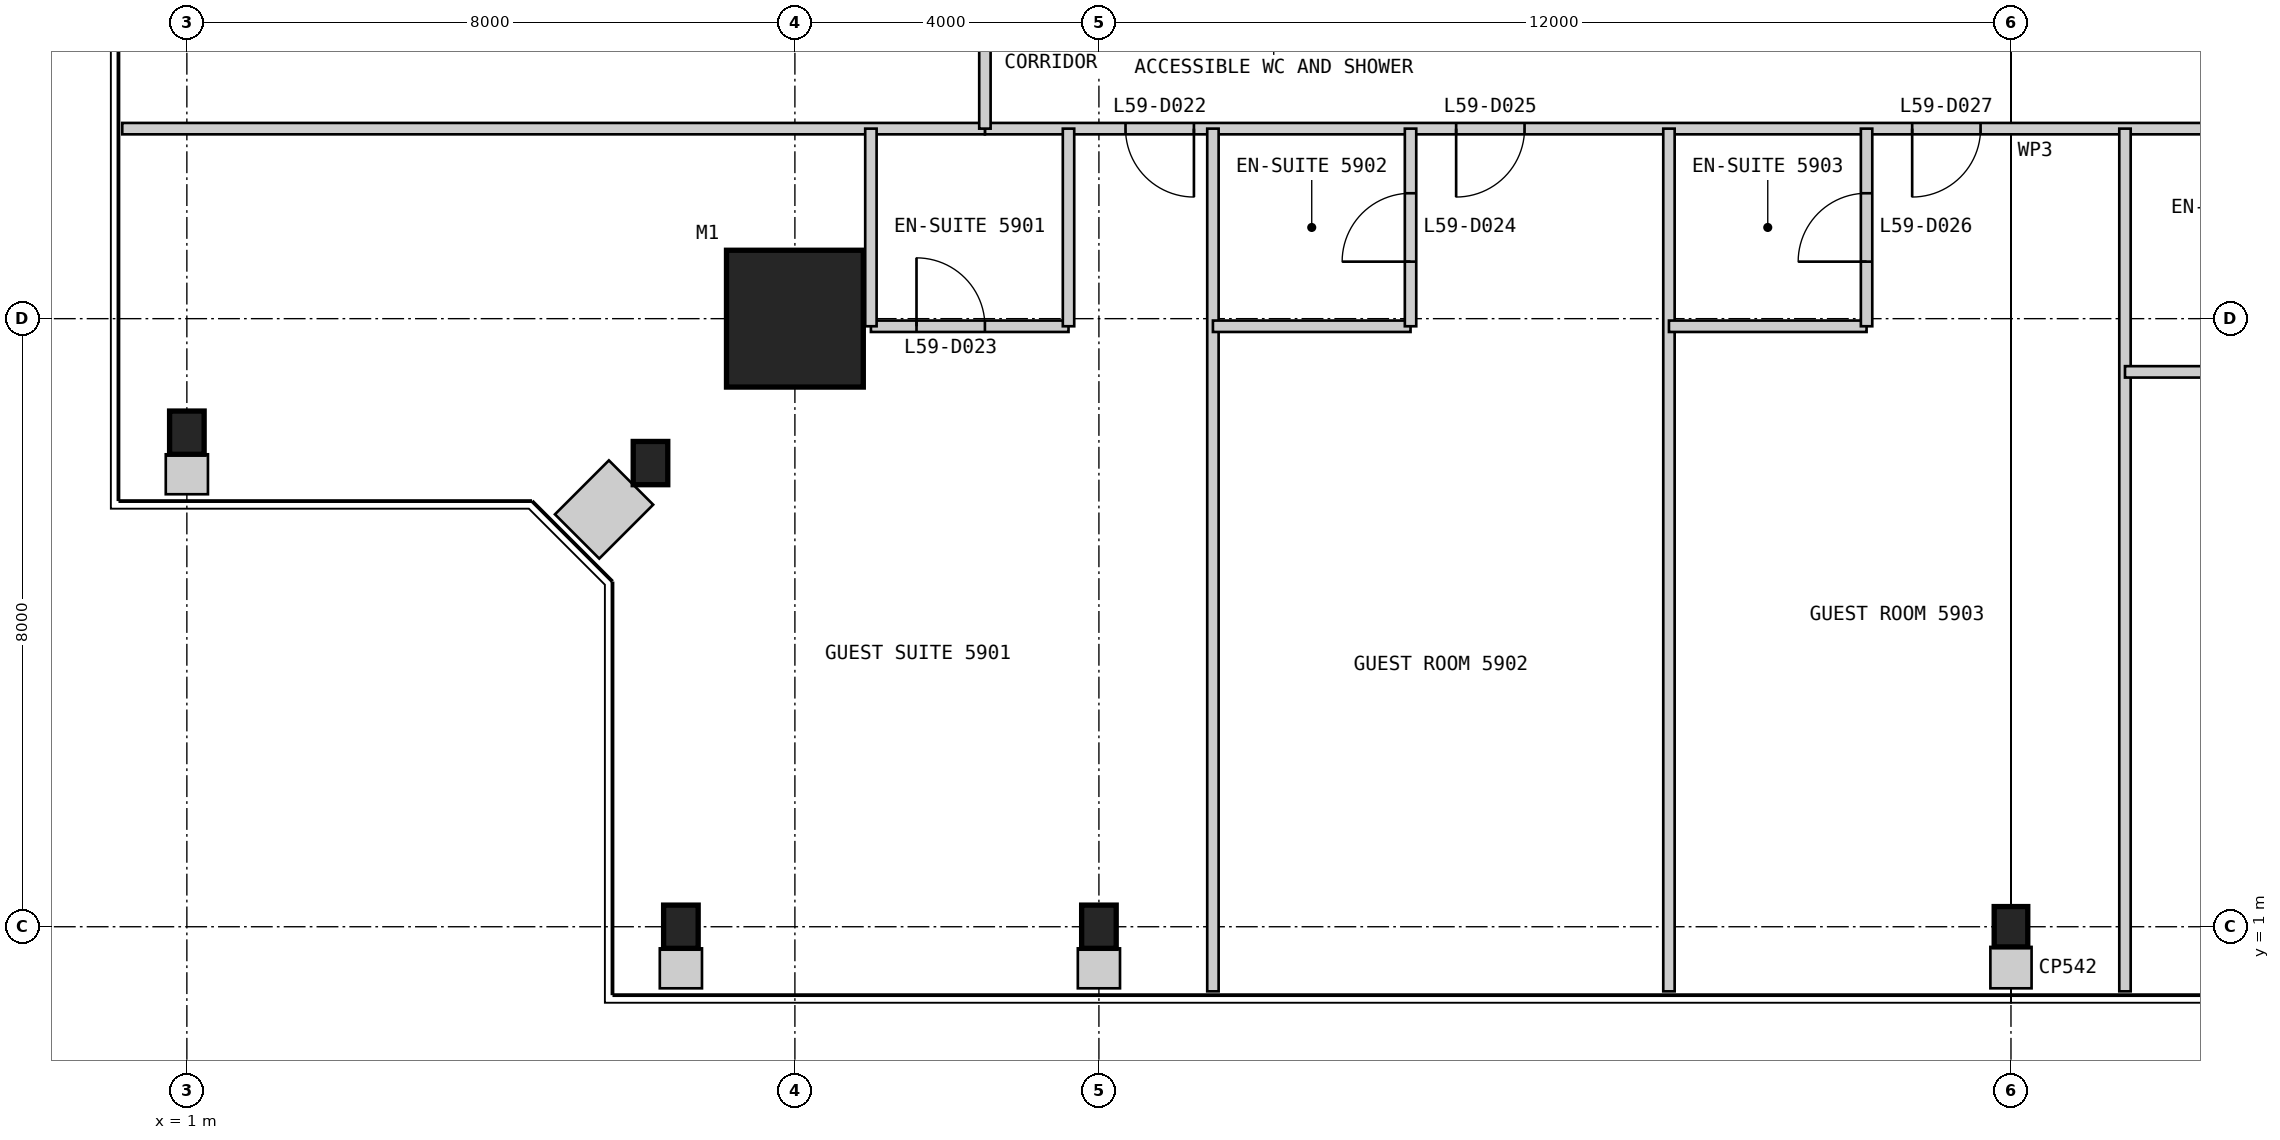
"""IFC4 building model, lengths in metres.
Left out: names, types, materials, properties, quantities, classifications, styles, units other than length and angle.
Written with IfcOpenShell. Run it as: python <this file> out.ifc"""

import sys

from ifc_helpers import new_model, si_unit, direction, frame, frame_2d, origin, origin_2d, place, context, subcontext, project, spatial, rectangle, i_section, extrude, element, fill, save


model = new_model("IFC4")
c1 = context("Model", 3, precision=1e-05, world=origin(), true_north=direction((0.0, 1.0)))
c2 = subcontext(c1, "Body", "Model", "MODEL_VIEW")
j1 = project(units=[si_unit("LENGTHUNIT", "METRE"), si_unit("PLANEANGLEUNIT", "RADIAN")], contexts=[c1])
p1 = place(None, origin())
s1 = spatial("IfcSite", under=j1, at=p1, CompositionType="ELEMENT")
p2 = place(p1, origin())
s2 = spatial("IfcBuilding", under=s1, at=p2, CompositionType="ELEMENT")
p3 = place(p2, frame((0.0, 0.0, 252.6)))
s3 = spatial("IfcBuildingStorey", under=s2, at=p3, CompositionType="ELEMENT", Elevation=252.6)
p4 = place(p3, frame((9.0, 9.0, 0.0), z_axis=(0.0, 0.0, 1.0), x_axis=(1.0, 0.0, 0.0)))
e1 = element("IfcColumn", 1, at=p4, inside=s3, PredefinedType="COLUMN", context=c2, shape_type="SweptSolid", body=[
    extrude(rectangle(XDim=1.8, YDim=1.8, at=origin_2d()), origin(), (0.0, 0.0, 1.0), 3.4),
])
for number, where, z_axis, x_axis in (
    (2, (7.5, 1.0, 0.0), (0.0, 0.0, 1.0), (1.0, 0.0, 0.0)),
    (3, (13.0, 1.0, 0.0), (0.0, 0.0, 1.0), (1.0, 0.0, 0.0)),
):
    element("IfcColumn", number, at=place(p3, frame(where, z_axis=z_axis, x_axis=x_axis)), inside=s3, PredefinedType="COLUMN", context=c2, shape_type="SweptSolid", body=[
        extrude(i_section(OverallWidth=0.455, OverallDepth=0.569, WebThickness=0.078, FlangeThickness=0.125, at=origin_2d()), origin(), (0.0, 0.0, 1.0), 3.4),
    ])
p5 = place(p3, frame((25.0, 1.0, 0.0), z_axis=(0.0, 0.0, 1.0), x_axis=(1.0, 0.0, 0.0)))
e4 = element("IfcColumn", 4, at=p5, inside=s3, PredefinedType="COLUMN", context=c2, shape_type="SweptSolid", body=[
    extrude(i_section(OverallWidth=0.442, OverallDepth=0.531, WebThickness=0.066, FlangeThickness=0.106, at=origin_2d()), origin(), (0.0, 0.0, 1.0), 3.4),
])
for number, where, z_axis, x_axis in (
    (5, (1.0, 7.5, 0.0), (0.0, 0.0, 1.0), (1.0, 0.0, 0.0)),
    (6, (7.1, 7.1, 0.0), (0.0, 0.0, 1.0), (1.0, 0.0, 0.0)),
):
    element("IfcColumn", number, at=place(p3, frame(where, z_axis=z_axis, x_axis=x_axis)), inside=s3, PredefinedType="COLUMN", context=c2, shape_type="SweptSolid", body=[
        extrude(i_section(OverallWidth=0.455, OverallDepth=0.569, WebThickness=0.078, FlangeThickness=0.125, at=origin_2d()), origin(), (0.0, 0.0, 1.0), 3.4),
    ])
p6 = place(p3, frame((11.5, 11.5, 0.0), z_axis=(0.0, 0.0, 1.0), x_axis=(1.0, 0.0, 0.0)))
e7 = element("IfcWall", 7, at=p6, inside=s3, PredefinedType="PARTITIONING", context=c2, shape_type="SweptSolid", body=[
    extrude(rectangle(XDim=27.0, YDim=0.15, at=frame_2d((13.5, 0.0))), origin(), (0.0, 0.0, 1.0), 3.25),
])
p7 = place(p6, frame((1.85, 0.0, 0.0)))
e8 = element("IfcOpeningElement", 8, at=p7, cuts=e7, PredefinedType="OPENING", context=c2, shape_type="SweptSolid", body=[
    extrude(rectangle(XDim=0.9, YDim=2.1, at=frame_2d((0.45, 1.05))), frame((0.0, 0.085, 0.0), z_axis=(0.0, -1.0, 0.0), x_axis=(1.0, 0.0, 0.0)), (0.0, 0.0, 1.0), 0.17),
])
p8 = place(p6, frame((6.2, 0.0, 0.0)))
e9 = element("IfcOpeningElement", 9, at=p8, cuts=e7, PredefinedType="OPENING", context=c2, shape_type="SweptSolid", body=[
    extrude(rectangle(XDim=0.9, YDim=2.1, at=frame_2d((0.45, 1.05))), frame((0.0, 0.085, 0.0), z_axis=(0.0, -1.0, 0.0), x_axis=(1.0, 0.0, 0.0)), (0.0, 0.0, 1.0), 0.17),
])
p9 = place(p6, frame((12.2, 0.0, 0.0)))
e10 = element("IfcOpeningElement", 10, at=p9, cuts=e7, PredefinedType="OPENING", context=c2, shape_type="SweptSolid", body=[
    extrude(rectangle(XDim=0.9, YDim=2.1, at=frame_2d((0.45, 1.05))), frame((0.0, 0.085, 0.0), z_axis=(0.0, -1.0, 0.0), x_axis=(1.0, 0.0, 0.0)), (0.0, 0.0, 1.0), 0.17),
])
p10 = place(p6, frame((18.8, 0.0, 0.0)))
e11 = element("IfcOpeningElement", 11, at=p10, cuts=e7, PredefinedType="OPENING", context=c2, shape_type="SweptSolid", body=[
    extrude(rectangle(XDim=1.0, YDim=2.1, at=frame_2d((0.5, 1.05))), frame((0.0, 0.085, 0.0), z_axis=(0.0, -1.0, 0.0), x_axis=(1.0, 0.0, 0.0)), (0.0, 0.0, 1.0), 0.17),
])
p11 = place(p6, frame((24.2, 0.0, 0.0)))
e12 = element("IfcOpeningElement", 12, at=p11, cuts=e7, PredefinedType="OPENING", context=c2, shape_type="SweptSolid", body=[
    extrude(rectangle(XDim=0.9, YDim=2.1, at=frame_2d((0.45, 1.05))), frame((0.0, 0.085, 0.0), z_axis=(0.0, -1.0, 0.0), x_axis=(1.0, 0.0, 0.0)), (0.0, 0.0, 1.0), 0.17),
])
p12 = place(p3, frame((0.15, 11.5, 0.0), z_axis=(0.0, 0.0, 1.0), x_axis=(1.0, 0.0, 0.0)))
e13 = element("IfcWall", 13, at=p12, inside=s3, PredefinedType="PARTITIONING", context=c2, shape_type="SweptSolid", body=[
    extrude(rectangle(XDim=11.35, YDim=0.15, at=frame_2d((5.675, 0.0))), origin(), (0.0, 0.0, 1.0), 3.25),
])
p13 = place(p3, frame((10.0, 8.9, 0.0), z_axis=(0.0, 0.0, 1.0), x_axis=(1.0, 0.0, 0.0)))
e14 = element("IfcWall", 14, at=p13, inside=s3, PredefinedType="PARTITIONING", context=c2, shape_type="SweptSolid", body=[
    extrude(rectangle(XDim=2.6, YDim=0.15, at=frame_2d((1.3, 0.0))), origin(), (0.0, 0.0, 1.0), 2.638),
])
p14 = place(p13, frame((0.6, 0.0, 0.0)))
e15 = element("IfcOpeningElement", 15, at=p14, cuts=e14, PredefinedType="OPENING", context=c2, shape_type="SweptSolid", body=[
    extrude(rectangle(XDim=0.9, YDim=2.1, at=frame_2d((0.45, 1.05))), frame((0.0, 0.085, 0.0), z_axis=(0.0, -1.0, 0.0), x_axis=(1.0, 0.0, 0.0)), (0.0, 0.0, 1.0), 0.17),
])
for number, where, z_axis, x_axis in (
    (16, (10.0, 8.9, 0.0), (0.0, 0.0, 1.0), (0.0, 1.0, 0.0)),
    (17, (12.6, 8.9, 0.0), (0.0, 0.0, 1.0), (0.0, 1.0, 0.0)),
):
    element("IfcWall", number, at=place(p3, frame(where, z_axis=z_axis, x_axis=x_axis)), inside=s3, PredefinedType="PARTITIONING", context=c2, shape_type="SweptSolid", body=[
        extrude(rectangle(XDim=2.6, YDim=0.15, at=frame_2d((1.3, 0.0))), origin(), (0.0, 0.0, 1.0), 3.25),
    ])
p15 = place(p3, frame((14.5, 0.15, 0.0), z_axis=(0.0, 0.0, 1.0), x_axis=(0.0, 1.0, 0.0)))
e18 = element("IfcWall", 18, at=p15, inside=s3, PredefinedType="PARTITIONING", context=c2, shape_type="SweptSolid", body=[
    extrude(rectangle(XDim=11.35, YDim=0.15, at=frame_2d((5.675, 0.0))), origin(), (0.0, 0.0, 1.0), 3.25),
])
p16 = place(p3, frame((14.5, 8.9, 0.0), z_axis=(0.0, 0.0, 1.0), x_axis=(1.0, 0.0, 0.0)))
e19 = element("IfcWall", 19, at=p16, inside=s3, PredefinedType="PARTITIONING", context=c2, shape_type="SweptSolid", body=[
    extrude(rectangle(XDim=2.6, YDim=0.15, at=frame_2d((1.3, 0.0))), origin(), (0.0, 0.0, 1.0), 3.25),
])
p17 = place(p3, frame((17.1, 8.9, 0.0), z_axis=(0.0, 0.0, 1.0), x_axis=(0.0, 1.0, 0.0)))
e20 = element("IfcWall", 20, at=p17, inside=s3, PredefinedType="PARTITIONING", context=c2, shape_type="SweptSolid", body=[
    extrude(rectangle(XDim=2.6, YDim=0.15, at=frame_2d((1.3, 0.0))), origin(), (0.0, 0.0, 1.0), 3.25),
])
p18 = place(p17, frame((0.85, 0.0, 0.0)))
e21 = element("IfcOpeningElement", 21, at=p18, cuts=e20, PredefinedType="OPENING", context=c2, shape_type="SweptSolid", body=[
    extrude(rectangle(XDim=0.9, YDim=2.1, at=frame_2d((0.45, 1.05))), frame((0.0, 0.085, 0.0), z_axis=(0.0, -1.0, 0.0), x_axis=(1.0, 0.0, 0.0)), (0.0, 0.0, 1.0), 0.17),
])
p19 = place(p3, frame((20.5, 0.15, 0.0), z_axis=(0.0, 0.0, 1.0), x_axis=(0.0, 1.0, 0.0)))
e22 = element("IfcWall", 22, at=p19, inside=s3, PredefinedType="PARTITIONING", context=c2, shape_type="SweptSolid", body=[
    extrude(rectangle(XDim=11.35, YDim=0.15, at=frame_2d((5.675, 0.0))), origin(), (0.0, 0.0, 1.0), 3.25),
])
p20 = place(p3, frame((20.5, 8.9, 0.0), z_axis=(0.0, 0.0, 1.0), x_axis=(1.0, 0.0, 0.0)))
e23 = element("IfcWall", 23, at=p20, inside=s3, PredefinedType="PARTITIONING", context=c2, shape_type="SweptSolid", body=[
    extrude(rectangle(XDim=2.6, YDim=0.15, at=frame_2d((1.3, 0.0))), origin(), (0.0, 0.0, 1.0), 3.25),
])
p21 = place(p3, frame((23.1, 8.9, 0.0), z_axis=(0.0, 0.0, 1.0), x_axis=(0.0, 1.0, 0.0)))
e24 = element("IfcWall", 24, at=p21, inside=s3, PredefinedType="PARTITIONING", context=c2, shape_type="SweptSolid", body=[
    extrude(rectangle(XDim=2.6, YDim=0.15, at=frame_2d((1.3, 0.0))), origin(), (0.0, 0.0, 1.0), 3.25),
])
p22 = place(p21, frame((0.85, 0.0, 0.0)))
e25 = element("IfcOpeningElement", 25, at=p22, cuts=e24, PredefinedType="OPENING", context=c2, shape_type="SweptSolid", body=[
    extrude(rectangle(XDim=0.9, YDim=2.1, at=frame_2d((0.45, 1.05))), frame((0.0, 0.085, 0.0), z_axis=(0.0, -1.0, 0.0), x_axis=(1.0, 0.0, 0.0)), (0.0, 0.0, 1.0), 0.17),
])
p23 = place(p3, frame((26.5, 0.15, 0.0), z_axis=(0.0, 0.0, 1.0), x_axis=(0.0, 1.0, 0.0)))
e26 = element("IfcWall", 26, at=p23, inside=s3, PredefinedType="PARTITIONING", context=c2, shape_type="SweptSolid", body=[
    extrude(rectangle(XDim=11.35, YDim=0.15, at=frame_2d((5.675, 0.0))), origin(), (0.0, 0.0, 1.0), 3.25),
])
p24 = place(p3, frame((26.5, 8.3, 0.0), z_axis=(0.0, 0.0, 1.0), x_axis=(1.0, 0.0, 0.0)))
e27 = element("IfcWall", 27, at=p24, inside=s3, PredefinedType="PARTITIONING", context=c2, shape_type="SweptSolid", body=[
    extrude(rectangle(XDim=3.2, YDim=0.15, at=frame_2d((1.6, 0.0))), origin(), (0.0, 0.0, 1.0), 3.25),
])
p25 = place(p3, frame((11.5, 38.5, 0.0), z_axis=(0.0, 0.0, 1.0), x_axis=(0.0, -1.0, 0.0)))
e28 = element("IfcWall", 28, at=p25, inside=s3, PredefinedType="PARTITIONING", context=c2, shape_type="SweptSolid", body=[
    extrude(rectangle(XDim=27.0, YDim=0.15, at=frame_2d((13.5, 0.0))), origin(), (0.0, 0.0, 1.0), 3.25),
])
p26 = place(p25, frame((1.85, 0.0, 0.0)))
e29 = element("IfcOpeningElement", 29, at=p26, cuts=e28, PredefinedType="OPENING", context=c2, shape_type="SweptSolid", body=[
    extrude(rectangle(XDim=0.9, YDim=2.1, at=frame_2d((0.45, 1.05))), frame((0.0, 0.085, 0.0), z_axis=(0.0, -1.0, 0.0), x_axis=(1.0, 0.0, 0.0)), (0.0, 0.0, 1.0), 0.17),
])
p27 = place(p25, frame((6.2, 0.0, 0.0)))
e30 = element("IfcOpeningElement", 30, at=p27, cuts=e28, PredefinedType="OPENING", context=c2, shape_type="SweptSolid", body=[
    extrude(rectangle(XDim=0.9, YDim=2.1, at=frame_2d((0.45, 1.05))), frame((0.0, 0.085, 0.0), z_axis=(0.0, -1.0, 0.0), x_axis=(1.0, 0.0, 0.0)), (0.0, 0.0, 1.0), 0.17),
])
p28 = place(p25, frame((12.2, 0.0, 0.0)))
e31 = element("IfcOpeningElement", 31, at=p28, cuts=e28, PredefinedType="OPENING", context=c2, shape_type="SweptSolid", body=[
    extrude(rectangle(XDim=0.9, YDim=2.1, at=frame_2d((0.45, 1.05))), frame((0.0, 0.085, 0.0), z_axis=(0.0, -1.0, 0.0), x_axis=(1.0, 0.0, 0.0)), (0.0, 0.0, 1.0), 0.17),
])
p29 = place(p25, frame((18.2, 0.0, 0.0)))
e32 = element("IfcOpeningElement", 32, at=p29, cuts=e28, PredefinedType="OPENING", context=c2, shape_type="SweptSolid", body=[
    extrude(rectangle(XDim=0.9, YDim=2.1, at=frame_2d((0.45, 1.05))), frame((0.0, 0.085, 0.0), z_axis=(0.0, -1.0, 0.0), x_axis=(1.0, 0.0, 0.0)), (0.0, 0.0, 1.0), 0.17),
])
p30 = place(p25, frame((24.2, 0.0, 0.0)))
e33 = element("IfcOpeningElement", 33, at=p30, cuts=e28, PredefinedType="OPENING", context=c2, shape_type="SweptSolid", body=[
    extrude(rectangle(XDim=0.9, YDim=2.1, at=frame_2d((0.45, 1.05))), frame((0.0, 0.085, 0.0), z_axis=(0.0, -1.0, 0.0), x_axis=(1.0, 0.0, 0.0)), (0.0, 0.0, 1.0), 0.17),
])
for number, where, z_axis, x_axis in (
    (34, (7.5, 0.19, 0.0), (0.0, 0.0, 1.0), (0.0, 1.0, 0.0)),
    (35, (13.0, 0.19, 0.0), (0.0, 0.0, 1.0), (0.0, 1.0, 0.0)),
    (36, (1.0, 6.69, 0.0), (0.0, 0.0, 1.0), (0.0, 1.0, 0.0)),
):
    element("IfcWall", number, at=place(p3, frame(where, z_axis=z_axis, x_axis=x_axis)), inside=s3, PredefinedType="PARTITIONING", context=c2, shape_type="SweptSolid", body=[
        extrude(rectangle(XDim=0.526, YDim=0.555, at=frame_2d((0.263, 0.0))), origin(), (0.0, 0.0, 1.0), 3.25),
    ])
p31 = place(p3, frame((6.134, 6.134, 0.0), z_axis=(0.0, 0.0, 1.0), x_axis=(0.707106781187, 0.707106781187, 0.0)))
e37 = element("IfcWall", 37, at=p31, inside=s3, PredefinedType="PARTITIONING", context=c2, shape_type="SweptSolid", body=[
    extrude(rectangle(XDim=1.004, YDim=0.824, at=frame_2d((0.502, 0.0))), origin(), (0.0, 0.0, 1.0), 3.25),
])
p32 = place(p3, frame((25.0, 0.19, 0.0), z_axis=(0.0, 0.0, 1.0), x_axis=(0.0, 1.0, 0.0)))
e38 = element("IfcWall", 38, at=p32, inside=s3, PredefinedType="PARTITIONING", context=c2, shape_type="SweptSolid", body=[
    extrude(rectangle(XDim=0.545, YDim=0.542, at=frame_2d((0.272, 0.0))), origin(), (0.0, 0.0, 1.0), 3.25),
])
p33 = place(p7, frame((0.9, 0.0, 0.0), z_axis=(0.0, 0.0, 1.0), x_axis=(-1.0, 0.0, 0.0)))
e39 = element("IfcDoor", 39, at=p33, inside=s3, OperationType="SINGLE_SWING_LEFT", PredefinedType="DOOR", context=c2, shape_type="SweptSolid", body=[
    extrude(rectangle(XDim=0.9, YDim=2.1, at=frame_2d((0.45, 1.05))), frame((0.0, 0.025, 0.0), z_axis=(0.0, -1.0, 0.0), x_axis=(1.0, 0.0, 0.0)), (0.0, 0.0, 1.0), 0.05),
])
fill(e8, e39)
p34 = place(p14, origin())
e40 = element("IfcDoor", 40, at=p34, inside=s3, OperationType="SINGLE_SWING_LEFT", PredefinedType="DOOR", context=c2, shape_type="SweptSolid", body=[
    extrude(rectangle(XDim=0.9, YDim=2.1, at=frame_2d((0.45, 1.05))), frame((0.0, 0.025, 0.0), z_axis=(0.0, -1.0, 0.0), x_axis=(1.0, 0.0, 0.0)), (0.0, 0.0, 1.0), 0.05),
])
fill(e15, e40)
p35 = place(p18, origin())
e41 = element("IfcDoor", 41, at=p35, inside=s3, OperationType="SINGLE_SWING_LEFT", PredefinedType="DOOR", context=c2, shape_type="SweptSolid", body=[
    extrude(rectangle(XDim=0.9, YDim=2.1, at=frame_2d((0.45, 1.05))), frame((0.0, 0.025, 0.0), z_axis=(0.0, -1.0, 0.0), x_axis=(1.0, 0.0, 0.0)), (0.0, 0.0, 1.0), 0.05),
])
fill(e21, e41)
p36 = place(p8, frame((0.9, 0.0, 0.0), z_axis=(0.0, 0.0, 1.0), x_axis=(-1.0, 0.0, 0.0)))
e42 = element("IfcDoor", 42, at=p36, inside=s3, OperationType="SINGLE_SWING_RIGHT", PredefinedType="DOOR", context=c2, shape_type="SweptSolid", body=[
    extrude(rectangle(XDim=0.9, YDim=2.1, at=frame_2d((0.45, 1.05))), frame((0.0, 0.025, 0.0), z_axis=(0.0, -1.0, 0.0), x_axis=(1.0, 0.0, 0.0)), (0.0, 0.0, 1.0), 0.05),
])
fill(e9, e42)
p37 = place(p22, origin())
e43 = element("IfcDoor", 43, at=p37, inside=s3, OperationType="SINGLE_SWING_LEFT", PredefinedType="DOOR", context=c2, shape_type="SweptSolid", body=[
    extrude(rectangle(XDim=0.9, YDim=2.1, at=frame_2d((0.45, 1.05))), frame((0.0, 0.025, 0.0), z_axis=(0.0, -1.0, 0.0), x_axis=(1.0, 0.0, 0.0)), (0.0, 0.0, 1.0), 0.05),
])
fill(e25, e43)
p38 = place(p9, frame((0.9, 0.0, 0.0), z_axis=(0.0, 0.0, 1.0), x_axis=(-1.0, 0.0, 0.0)))
e44 = element("IfcDoor", 44, at=p38, inside=s3, OperationType="SINGLE_SWING_RIGHT", PredefinedType="DOOR", context=c2, shape_type="SweptSolid", body=[
    extrude(rectangle(XDim=0.9, YDim=2.1, at=frame_2d((0.45, 1.05))), frame((0.0, 0.025, 0.0), z_axis=(0.0, -1.0, 0.0), x_axis=(1.0, 0.0, 0.0)), (0.0, 0.0, 1.0), 0.05),
])
fill(e10, e44)
save(model, sys.argv[1])
